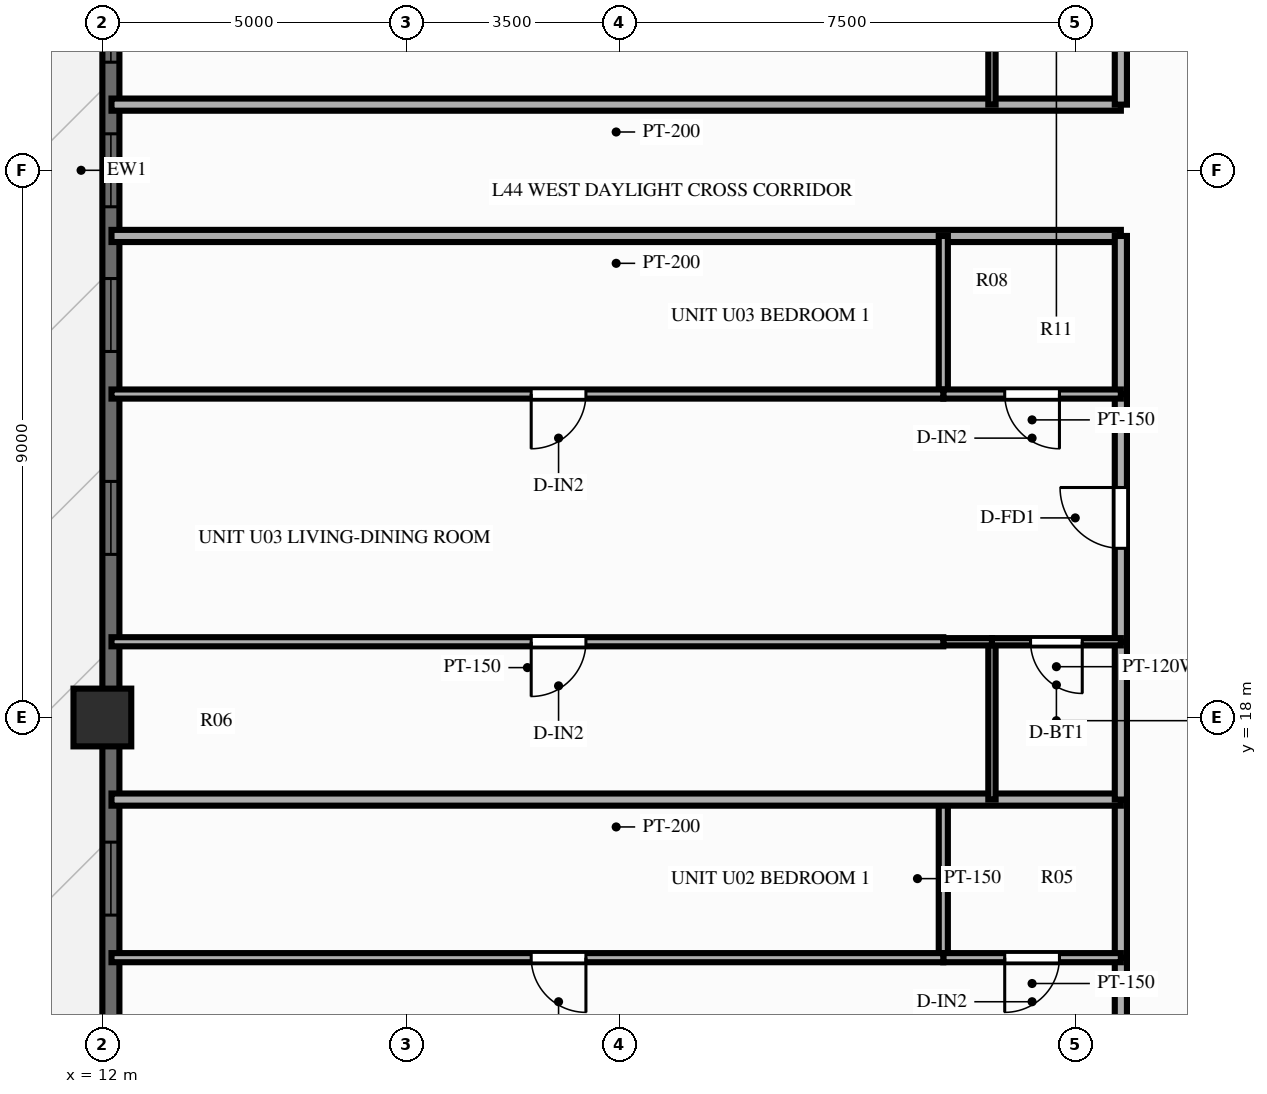
"""IFC4 building model, lengths in metres.
Left out: names, types, materials, properties, quantities, classifications, styles, units other than length and angle.
Written with IfcOpenShell. Run it as: python <this file> out.ifc"""

import sys

from ifc_helpers import new_model, si_unit, direction, frame, frame_2d, origin, origin_2d, place, context, subcontext, project, spatial, rectangle, extrude, source, transform, mapped, element, fill, save


model = new_model("IFC4")
c1 = context("Model", 3, precision=1e-05, world=origin(), true_north=direction((0.0, 1.0)))
c2 = subcontext(c1, "Body", "Model", "MODEL_VIEW")
j1 = project(units=[si_unit("LENGTHUNIT", "METRE"), si_unit("PLANEANGLEUNIT", "RADIAN")], contexts=[c1])
p1 = place(None, origin())
s1 = spatial("IfcSite", under=j1, at=p1, CompositionType="ELEMENT")
p2 = place(p1, origin())
s2 = spatial("IfcBuilding", under=s1, at=p2, CompositionType="ELEMENT")
p3 = place(p2, frame((0.0, 0.0, 138.75)))
s3 = spatial("IfcBuildingStorey", under=s2, at=p3, CompositionType="ELEMENT", Elevation=138.75)
m1 = source(origin(), c2, "Body", "SweptSolid", [
    extrude(rectangle(XDim=0.95, YDim=0.95, at=origin_2d()), origin(), (0.0, 0.0, 1.0), 3.0),
])
p4 = place(p3, frame((12.0, 18.0, 0.0), z_axis=(0.0, 0.0, 1.0), x_axis=(1.0, 0.0, 0.0)))
e1 = element("IfcColumn", 1, at=p4, inside=s3, PredefinedType="COLUMN", context=c2, shape_type="MappedRepresentation", body=[
    mapped(m1, transform((0.0, 0.0, 0.0), scale=1.0)),
])
p5 = place(p3, frame((12.14, 7.2, 0.0), z_axis=(0.0, 0.0, 1.0), x_axis=(0.0, 1.0, 0.0)))
e2 = element("IfcWall", 2, at=p5, inside=s3, PredefinedType="SOLIDWALL", context=c2, shape_type="SweptSolid", body=[
    extrude(rectangle(XDim=39.6, YDim=0.28, at=frame_2d((19.8, 0.0))), origin(), (0.0, 0.0, 1.0), 2.28),
])
p6 = place(p5, frame((0.945, 0.0, 0.25)))
e3 = element("IfcOpeningElement", 3, at=p6, cuts=e2, PredefinedType="OPENING", context=c2, shape_type="SweptSolid", body=[
    extrude(rectangle(XDim=1.2, YDim=1.5, at=frame_2d((0.6, 0.75))), frame((0.0, 0.152, 0.0), z_axis=(0.0, -1.0, 0.0), x_axis=(1.0, 0.0, 0.0)), (0.0, 0.0, 1.0), 0.304),
])
p7 = place(p5, frame((4.213, 0.0, 0.25)))
e4 = element("IfcOpeningElement", 4, at=p7, cuts=e2, PredefinedType="OPENING", context=c2, shape_type="SweptSolid", body=[
    extrude(rectangle(XDim=1.2, YDim=1.5, at=frame_2d((0.6, 0.75))), frame((0.0, 0.152, 0.0), z_axis=(0.0, -1.0, 0.0), x_axis=(1.0, 0.0, 0.0)), (0.0, 0.0, 1.0), 0.304),
])
p8 = place(p5, frame((7.55, 0.0, 0.25)))
e5 = element("IfcOpeningElement", 5, at=p8, cuts=e2, PredefinedType="OPENING", context=c2, shape_type="SweptSolid", body=[
    extrude(rectangle(XDim=1.2, YDim=1.5, at=frame_2d((0.6, 0.75))), frame((0.0, 0.152, 0.0), z_axis=(0.0, -1.0, 0.0), x_axis=(1.0, 0.0, 0.0)), (0.0, 0.0, 1.0), 0.304),
])
p9 = place(p5, frame((13.483, 0.0, 0.25)))
e6 = element("IfcOpeningElement", 6, at=p9, cuts=e2, PredefinedType="OPENING", context=c2, shape_type="SweptSolid", body=[
    extrude(rectangle(XDim=1.2, YDim=1.5, at=frame_2d((0.6, 0.75))), frame((0.0, 0.152, 0.0), z_axis=(0.0, -1.0, 0.0), x_axis=(1.0, 0.0, 0.0)), (0.0, 0.0, 1.0), 0.304),
])
p10 = place(p5, frame((16.82, 0.0, 0.25)))
e7 = element("IfcOpeningElement", 7, at=p10, cuts=e2, PredefinedType="OPENING", context=c2, shape_type="SweptSolid", body=[
    extrude(rectangle(XDim=1.2, YDim=1.5, at=frame_2d((0.6, 0.75))), frame((0.0, 0.152, 0.0), z_axis=(0.0, -1.0, 0.0), x_axis=(1.0, 0.0, 0.0)), (0.0, 0.0, 1.0), 0.304),
])
p11 = place(p5, frame((19.2, 0.0, 0.25)))
e8 = element("IfcOpeningElement", 8, at=p11, cuts=e2, PredefinedType="OPENING", context=c2, shape_type="SweptSolid", body=[
    extrude(rectangle(XDim=1.2, YDim=1.5, at=frame_2d((0.6, 0.75))), frame((0.0, 0.152, 0.0), z_axis=(0.0, -1.0, 0.0), x_axis=(1.0, 0.0, 0.0)), (0.0, 0.0, 1.0), 0.304),
])
p12 = place(p5, frame((21.578, 0.0, 0.25)))
e9 = element("IfcOpeningElement", 9, at=p12, cuts=e2, PredefinedType="OPENING", context=c2, shape_type="SweptSolid", body=[
    extrude(rectangle(XDim=1.2, YDim=1.5, at=frame_2d((0.6, 0.75))), frame((0.0, 0.152, 0.0), z_axis=(0.0, -1.0, 0.0), x_axis=(1.0, 0.0, 0.0)), (0.0, 0.0, 1.0), 0.304),
])
p13 = place(p5, frame((24.713, 0.0, 0.0)))
e10 = element("IfcOpeningElement", 10, at=p13, cuts=e2, PredefinedType="OPENING", context=c2, shape_type="SweptSolid", body=[
    extrude(rectangle(XDim=1.6, YDim=2.15, at=frame_2d((0.8, 1.075))), frame((0.0, 0.152, 0.0), z_axis=(0.0, -1.0, 0.0), x_axis=(1.0, 0.0, 0.0)), (0.0, 0.0, 1.0), 0.304),
])
p14 = place(p5, frame((29.305, 0.0, 0.25)))
e11 = element("IfcOpeningElement", 11, at=p14, cuts=e2, PredefinedType="OPENING", context=c2, shape_type="SweptSolid", body=[
    extrude(rectangle(XDim=0.7, YDim=1.5, at=frame_2d((0.35, 0.75))), frame((0.0, 0.152, 0.0), z_axis=(0.0, -1.0, 0.0), x_axis=(1.0, 0.0, 0.0)), (0.0, 0.0, 1.0), 0.304),
])
p15 = place(p5, frame((30.848, 0.0, 0.25)))
e12 = element("IfcOpeningElement", 12, at=p15, cuts=e2, PredefinedType="OPENING", context=c2, shape_type="SweptSolid", body=[
    extrude(rectangle(XDim=1.2, YDim=1.5, at=frame_2d((0.6, 0.75))), frame((0.0, 0.152, 0.0), z_axis=(0.0, -1.0, 0.0), x_axis=(1.0, 0.0, 0.0)), (0.0, 0.0, 1.0), 0.304),
])
p16 = place(p5, frame((34.183, 0.0, 0.25)))
e13 = element("IfcOpeningElement", 13, at=p16, cuts=e2, PredefinedType="OPENING", context=c2, shape_type="SweptSolid", body=[
    extrude(rectangle(XDim=1.2, YDim=1.5, at=frame_2d((0.6, 0.75))), frame((0.0, 0.152, 0.0), z_axis=(0.0, -1.0, 0.0), x_axis=(1.0, 0.0, 0.0)), (0.0, 0.0, 1.0), 0.304),
])
p17 = place(p5, frame((37.452, 0.0, 0.25)))
e14 = element("IfcOpeningElement", 14, at=p17, cuts=e2, PredefinedType="OPENING", context=c2, shape_type="SweptSolid", body=[
    extrude(rectangle(XDim=1.2, YDim=1.5, at=frame_2d((0.6, 0.75))), frame((0.0, 0.152, 0.0), z_axis=(0.0, -1.0, 0.0), x_axis=(1.0, 0.0, 0.0)), (0.0, 0.0, 1.0), 0.304),
])
p18 = place(p3, frame((28.75, 25.92, 0.0), z_axis=(0.0, 0.0, 1.0), x_axis=(-1.0, 0.0, 0.0)))
e15 = element("IfcWall", 15, at=p18, inside=s3, PredefinedType="PARTITIONING", context=c2, shape_type="SweptSolid", body=[
    extrude(rectangle(XDim=16.6, YDim=0.2, at=frame_2d((8.3, 0.0))), origin(), (0.0, 0.0, 1.0), 2.79),
])
p19 = place(p3, frame((28.75, 9.976, 0.0), z_axis=(0.0, 0.0, 1.0), x_axis=(0.0, 1.0, 0.0)))
e16 = element("IfcWall", 16, at=p19, inside=s3, PredefinedType="PARTITIONING", context=c2, shape_type="SweptSolid", body=[
    extrude(rectangle(XDim=4.074, YDim=0.2, at=frame_2d((2.037, 0.0))), origin(), (0.0, 0.0, 1.0), 2.79),
])
p20 = place(p19, frame((1.537, 0.0, 0.0)))
e17 = element("IfcOpeningElement", 17, at=p20, cuts=e16, PredefinedType="OPENING", context=c2, shape_type="SweptSolid", body=[
    extrude(rectangle(XDim=1.0, YDim=2.15, at=frame_2d((0.5, 1.075))), frame((0.0, 0.112, 0.0), z_axis=(0.0, -1.0, 0.0), x_axis=(1.0, 0.0, 0.0)), (0.0, 0.0, 1.0), 0.224),
])
p21 = place(p3, frame((28.75, 14.05, 0.0), z_axis=(0.0, 0.0, 1.0), x_axis=(0.0, 1.0, 0.0)))
e18 = element("IfcWall", 18, at=p21, inside=s3, PredefinedType="PARTITIONING", context=c2, shape_type="SweptSolid", body=[
    extrude(rectangle(XDim=2.6, YDim=0.2, at=frame_2d((1.3, 0.0))), origin(), (0.0, 0.0, 1.0), 2.79),
])
p22 = place(p3, frame((25.83, 14.05, 0.0), z_axis=(0.0, 0.0, 1.0), x_axis=(0.0, 1.0, 0.0)))
e19 = element("IfcWall", 19, at=p22, inside=s3, PredefinedType="PARTITIONING", context=c2, shape_type="SweptSolid", body=[
    extrude(rectangle(XDim=2.6, YDim=0.15, at=frame_2d((1.3, 0.0))), origin(), (0.0, 0.0, 1.0), 2.79),
])
p23 = place(p3, frame((28.75, 14.05, 0.0), z_axis=(0.0, 0.0, 1.0), x_axis=(-1.0, 0.0, 0.0)))
e20 = element("IfcWall", 20, at=p23, inside=s3, PredefinedType="PARTITIONING", context=c2, shape_type="SweptSolid", body=[
    extrude(rectangle(XDim=2.92, YDim=0.15, at=frame_2d((1.46, 0.0))), origin(), (0.0, 0.0, 1.0), 2.79),
])
p24 = place(p23, frame((1.01, 0.0, 0.0)))
e21 = element("IfcOpeningElement", 21, at=p24, cuts=e20, PredefinedType="OPENING", context=c2, shape_type="SweptSolid", body=[
    extrude(rectangle(XDim=0.9, YDim=2.1, at=frame_2d((0.45, 1.05))), frame((0.0, 0.087, 0.0), z_axis=(0.0, -1.0, 0.0), x_axis=(1.0, 0.0, 0.0)), (0.0, 0.0, 1.0), 0.174),
])
p25 = place(p3, frame((25.83, 14.05, 0.0), z_axis=(0.0, 0.0, 1.0), x_axis=(-1.0, 0.0, 0.0)))
e22 = element("IfcWall", 22, at=p25, inside=s3, PredefinedType="PARTITIONING", context=c2, shape_type="SweptSolid", body=[
    extrude(rectangle(XDim=13.68, YDim=0.15, at=frame_2d((6.84, 0.0))), origin(), (0.0, 0.0, 1.0), 2.79),
])
p26 = place(p25, frame((5.877, 0.0, 0.0)))
e23 = element("IfcOpeningElement", 23, at=p26, cuts=e22, PredefinedType="OPENING", context=c2, shape_type="SweptSolid", body=[
    extrude(rectangle(XDim=0.9, YDim=2.1, at=frame_2d((0.45, 1.05))), frame((0.0, 0.087, 0.0), z_axis=(0.0, -1.0, 0.0), x_axis=(1.0, 0.0, 0.0)), (0.0, 0.0, 1.0), 0.174),
])
p27 = place(p3, frame((28.75, 16.65, 0.0), z_axis=(0.0, 0.0, 1.0), x_axis=(-1.0, 0.0, 0.0)))
e24 = element("IfcWall", 24, at=p27, inside=s3, PredefinedType="PARTITIONING", context=c2, shape_type="SweptSolid", body=[
    extrude(rectangle(XDim=16.6, YDim=0.2, at=frame_2d((8.3, 0.0))), origin(), (0.0, 0.0, 1.0), 2.79),
])
p28 = place(p3, frame((28.75, 16.65, 0.0), z_axis=(0.0, 0.0, 1.0), x_axis=(0.0, 1.0, 0.0)))
e25 = element("IfcWall", 25, at=p28, inside=s3, PredefinedType="PARTITIONING", context=c2, shape_type="SweptSolid", body=[
    extrude(rectangle(XDim=2.596, YDim=0.2, at=frame_2d((1.298, 0.0))), origin(), (0.0, 0.0, 1.0), 2.79),
])
p29 = place(p3, frame((28.75, 19.246, 0.0), z_axis=(0.0, 0.0, 1.0), x_axis=(0.0, 1.0, 0.0)))
e26 = element("IfcWall", 26, at=p29, inside=s3, PredefinedType="PARTITIONING", context=c2, shape_type="SweptSolid", body=[
    extrude(rectangle(XDim=4.074, YDim=0.2, at=frame_2d((2.037, 0.0))), origin(), (0.0, 0.0, 1.0), 2.79),
])
p30 = place(p29, frame((1.537, 0.0, 0.0)))
e27 = element("IfcOpeningElement", 27, at=p30, cuts=e26, PredefinedType="OPENING", context=c2, shape_type="SweptSolid", body=[
    extrude(rectangle(XDim=1.0, YDim=2.15, at=frame_2d((0.5, 1.075))), frame((0.0, 0.112, 0.0), z_axis=(0.0, -1.0, 0.0), x_axis=(1.0, 0.0, 0.0)), (0.0, 0.0, 1.0), 0.224),
])
p31 = place(p3, frame((28.75, 23.32, 0.0), z_axis=(0.0, 0.0, 1.0), x_axis=(0.0, 1.0, 0.0)))
e28 = element("IfcWall", 28, at=p31, inside=s3, PredefinedType="PARTITIONING", context=c2, shape_type="SweptSolid", body=[
    extrude(rectangle(XDim=2.6, YDim=0.2, at=frame_2d((1.3, 0.0))), origin(), (0.0, 0.0, 1.0), 2.79),
])
p32 = place(p3, frame((26.63, 16.65, 0.0), z_axis=(0.0, 0.0, 1.0), x_axis=(0.0, 1.0, 0.0)))
e29 = element("IfcWall", 29, at=p32, inside=s3, PredefinedType="PARTITIONING", context=c2, shape_type="SweptSolid", body=[
    extrude(rectangle(XDim=2.596, YDim=0.12, at=frame_2d((1.298, 0.0))), origin(), (0.0, 0.0, 1.0), 2.79),
])
p33 = place(p3, frame((25.83, 23.32, 0.0), z_axis=(0.0, 0.0, 1.0), x_axis=(0.0, 1.0, 0.0)))
e30 = element("IfcWall", 30, at=p33, inside=s3, PredefinedType="PARTITIONING", context=c2, shape_type="SweptSolid", body=[
    extrude(rectangle(XDim=2.6, YDim=0.15, at=frame_2d((1.3, 0.0))), origin(), (0.0, 0.0, 1.0), 2.79),
])
p34 = place(p3, frame((28.75, 19.246, 0.0), z_axis=(0.0, 0.0, 1.0), x_axis=(-1.0, 0.0, 0.0)))
e31 = element("IfcWall", 31, at=p34, inside=s3, PredefinedType="PARTITIONING", context=c2, shape_type="SweptSolid", body=[
    extrude(rectangle(XDim=2.12, YDim=0.12, at=frame_2d((1.06, 0.0))), origin(), (0.0, 0.0, 1.0), 2.79),
])
p35 = place(p34, frame((0.635, 0.0, 0.0)))
e32 = element("IfcOpeningElement", 32, at=p35, cuts=e31, PredefinedType="OPENING", context=c2, shape_type="SweptSolid", body=[
    extrude(rectangle(XDim=0.85, YDim=2.05, at=frame_2d((0.425, 1.025))), frame((0.0, 0.072, 0.0), z_axis=(0.0, -1.0, 0.0), x_axis=(1.0, 0.0, 0.0)), (0.0, 0.0, 1.0), 0.144),
])
p36 = place(p3, frame((26.63, 19.246, 0.0), z_axis=(0.0, 0.0, 1.0), x_axis=(-1.0, 0.0, 0.0)))
e33 = element("IfcWall", 33, at=p36, inside=s3, PredefinedType="PARTITIONING", context=c2, shape_type="SweptSolid", body=[
    extrude(rectangle(XDim=0.8, YDim=0.12, at=frame_2d((0.4, 0.0))), origin(), (0.0, 0.0, 1.0), 2.79),
])
p37 = place(p3, frame((25.83, 19.246, 0.0), z_axis=(0.0, 0.0, 1.0), x_axis=(-1.0, 0.0, 0.0)))
e34 = element("IfcWall", 34, at=p37, inside=s3, PredefinedType="PARTITIONING", context=c2, shape_type="SweptSolid", body=[
    extrude(rectangle(XDim=13.68, YDim=0.15, at=frame_2d((6.84, 0.0))), origin(), (0.0, 0.0, 1.0), 2.79),
])
p38 = place(p37, frame((5.877, 0.0, 0.0)))
e35 = element("IfcOpeningElement", 35, at=p38, cuts=e34, PredefinedType="OPENING", context=c2, shape_type="SweptSolid", body=[
    extrude(rectangle(XDim=0.9, YDim=2.1, at=frame_2d((0.45, 1.05))), frame((0.0, 0.087, 0.0), z_axis=(0.0, -1.0, 0.0), x_axis=(1.0, 0.0, 0.0)), (0.0, 0.0, 1.0), 0.174),
])
p39 = place(p3, frame((28.75, 23.32, 0.0), z_axis=(0.0, 0.0, 1.0), x_axis=(-1.0, 0.0, 0.0)))
e36 = element("IfcWall", 36, at=p39, inside=s3, PredefinedType="PARTITIONING", context=c2, shape_type="SweptSolid", body=[
    extrude(rectangle(XDim=2.92, YDim=0.15, at=frame_2d((1.46, 0.0))), origin(), (0.0, 0.0, 1.0), 2.79),
])
p40 = place(p39, frame((1.01, 0.0, 0.0)))
e37 = element("IfcOpeningElement", 37, at=p40, cuts=e36, PredefinedType="OPENING", context=c2, shape_type="SweptSolid", body=[
    extrude(rectangle(XDim=0.9, YDim=2.1, at=frame_2d((0.45, 1.05))), frame((0.0, 0.087, 0.0), z_axis=(0.0, -1.0, 0.0), x_axis=(1.0, 0.0, 0.0)), (0.0, 0.0, 1.0), 0.174),
])
p41 = place(p3, frame((25.83, 23.32, 0.0), z_axis=(0.0, 0.0, 1.0), x_axis=(-1.0, 0.0, 0.0)))
e38 = element("IfcWall", 38, at=p41, inside=s3, PredefinedType="PARTITIONING", context=c2, shape_type="SweptSolid", body=[
    extrude(rectangle(XDim=13.68, YDim=0.15, at=frame_2d((6.84, 0.0))), origin(), (0.0, 0.0, 1.0), 2.79),
])
p42 = place(p41, frame((5.877, 0.0, 0.0)))
e39 = element("IfcOpeningElement", 39, at=p42, cuts=e38, PredefinedType="OPENING", context=c2, shape_type="SweptSolid", body=[
    extrude(rectangle(XDim=0.9, YDim=2.1, at=frame_2d((0.45, 1.05))), frame((0.0, 0.087, 0.0), z_axis=(0.0, -1.0, 0.0), x_axis=(1.0, 0.0, 0.0)), (0.0, 0.0, 1.0), 0.174),
])
p43 = place(p3, frame((28.75, 28.08, 0.0), z_axis=(0.0, 0.0, 1.0), x_axis=(-1.0, 0.0, 0.0)))
e40 = element("IfcWall", 40, at=p43, inside=s3, PredefinedType="PARTITIONING", context=c2, shape_type="SweptSolid", body=[
    extrude(rectangle(XDim=16.6, YDim=0.2, at=frame_2d((8.3, 0.0))), origin(), (0.0, 0.0, 1.0), 2.79),
])
p44 = place(p3, frame((28.75, 28.08, 0.0), z_axis=(0.0, 0.0, 1.0), x_axis=(0.0, 1.0, 0.0)))
e41 = element("IfcWall", 41, at=p44, inside=s3, PredefinedType="PARTITIONING", context=c2, shape_type="SweptSolid", body=[
    extrude(rectangle(XDim=2.595, YDim=0.2, at=frame_2d((1.298, 0.0))), origin(), (0.0, 0.0, 1.0), 2.79),
])
p45 = place(p3, frame((26.63, 28.08, 0.0), z_axis=(0.0, 0.0, 1.0), x_axis=(0.0, 1.0, 0.0)))
e42 = element("IfcWall", 42, at=p45, inside=s3, PredefinedType="PARTITIONING", context=c2, shape_type="SweptSolid", body=[
    extrude(rectangle(XDim=2.595, YDim=0.12, at=frame_2d((1.298, 0.0))), origin(), (0.0, 0.0, 1.0), 2.79),
])
m2 = source(origin(), c2, "Body", "SweptSolid", [
    extrude(rectangle(XDim=1.2, YDim=1.5, at=frame_2d((0.6, 0.75))), frame((0.0, 0.03, 0.0), z_axis=(0.0, -1.0, 0.0), x_axis=(1.0, 0.0, 0.0)), (0.0, 0.0, 1.0), 0.06),
])
p46 = place(p8, origin())
e43 = element("IfcWindow", 43, at=p46, inside=s3, PartitioningType="SINGLE_PANEL", PredefinedType="WINDOW", context=c2, shape_type="MappedRepresentation", body=[
    mapped(m2, transform((0.0, 0.0, 0.0), scale=1.0)),
])
fill(e5, e43)
p47 = place(p9, origin())
e44 = element("IfcWindow", 44, at=p47, inside=s3, PartitioningType="SINGLE_PANEL", PredefinedType="WINDOW", context=c2, shape_type="MappedRepresentation", body=[
    mapped(m2, transform((0.0, 0.0, 0.0), scale=1.0)),
])
fill(e6, e44)
p48 = place(p10, origin())
e45 = element("IfcWindow", 45, at=p48, inside=s3, PartitioningType="SINGLE_PANEL", PredefinedType="WINDOW", context=c2, shape_type="MappedRepresentation", body=[
    mapped(m2, transform((0.0, 0.0, 0.0), scale=1.0)),
])
fill(e7, e45)
p49 = place(p11, origin())
e46 = element("IfcWindow", 46, at=p49, inside=s3, PartitioningType="SINGLE_PANEL", PredefinedType="WINDOW", context=c2, shape_type="MappedRepresentation", body=[
    mapped(m2, transform((0.0, 0.0, 0.0), scale=1.0)),
])
fill(e8, e46)
p50 = place(p12, origin())
e47 = element("IfcWindow", 47, at=p50, inside=s3, PartitioningType="SINGLE_PANEL", PredefinedType="WINDOW", context=c2, shape_type="MappedRepresentation", body=[
    mapped(m2, transform((0.0, 0.0, 0.0), scale=1.0)),
])
fill(e9, e47)
m3 = source(origin(), c2, "Body", "SweptSolid", [
    extrude(rectangle(XDim=0.9, YDim=2.1, at=frame_2d((0.45, 1.05))), frame((0.0, 0.025, 0.0), z_axis=(0.0, -1.0, 0.0), x_axis=(1.0, 0.0, 0.0)), (0.0, 0.0, 1.0), 0.05),
])
p51 = place(p24, origin())
e48 = element("IfcDoor", 48, at=p51, inside=s3, OperationType="SINGLE_SWING_RIGHT", PredefinedType="DOOR", context=c2, shape_type="MappedRepresentation", body=[
    mapped(m3, transform((0.0, 0.0, 0.0), scale=1.0)),
])
fill(e21, e48)
p52 = place(p26, origin())
e49 = element("IfcDoor", 49, at=p52, inside=s3, OperationType="SINGLE_SWING_LEFT", PredefinedType="DOOR", context=c2, shape_type="MappedRepresentation", body=[
    mapped(m3, transform((0.0, 0.0, 0.0), scale=1.0)),
])
fill(e23, e49)
m4 = source(origin(), c2, "Body", "SweptSolid", [
    extrude(rectangle(XDim=1.0, YDim=2.15, at=frame_2d((0.5, 1.075))), frame((0.0, 0.025, 0.0), z_axis=(0.0, -1.0, 0.0), x_axis=(1.0, 0.0, 0.0)), (0.0, 0.0, 1.0), 0.05),
])
p53 = place(p30, origin())
e50 = element("IfcDoor", 50, at=p53, inside=s3, OperationType="SINGLE_SWING_RIGHT", PredefinedType="DOOR", context=c2, shape_type="MappedRepresentation", body=[
    mapped(m4, transform((0.0, 0.0, 0.0), scale=1.0)),
])
fill(e27, e50)
m5 = source(origin(), c2, "Body", "SweptSolid", [
    extrude(rectangle(XDim=0.85, YDim=2.05, at=frame_2d((0.425, 1.025))), frame((0.0, 0.025, 0.0), z_axis=(0.0, -1.0, 0.0), x_axis=(1.0, 0.0, 0.0)), (0.0, 0.0, 1.0), 0.05),
])
p54 = place(p35, origin())
e51 = element("IfcDoor", 51, at=p54, inside=s3, OperationType="SINGLE_SWING_LEFT", PredefinedType="DOOR", context=c2, shape_type="MappedRepresentation", body=[
    mapped(m5, transform((0.0, 0.0, 0.0), scale=1.0)),
])
fill(e32, e51)
p55 = place(p38, origin())
e52 = element("IfcDoor", 52, at=p55, inside=s3, OperationType="SINGLE_SWING_RIGHT", PredefinedType="DOOR", context=c2, shape_type="MappedRepresentation", body=[
    mapped(m3, transform((0.0, 0.0, 0.0), scale=1.0)),
])
fill(e35, e52)
p56 = place(p40, origin())
e53 = element("IfcDoor", 53, at=p56, inside=s3, OperationType="SINGLE_SWING_LEFT", PredefinedType="DOOR", context=c2, shape_type="MappedRepresentation", body=[
    mapped(m3, transform((0.0, 0.0, 0.0), scale=1.0)),
])
fill(e37, e53)
p57 = place(p42, origin())
e54 = element("IfcDoor", 54, at=p57, inside=s3, OperationType="SINGLE_SWING_RIGHT", PredefinedType="DOOR", context=c2, shape_type="MappedRepresentation", body=[
    mapped(m3, transform((0.0, 0.0, 0.0), scale=1.0)),
])
fill(e39, e54)
save(model, sys.argv[1])
